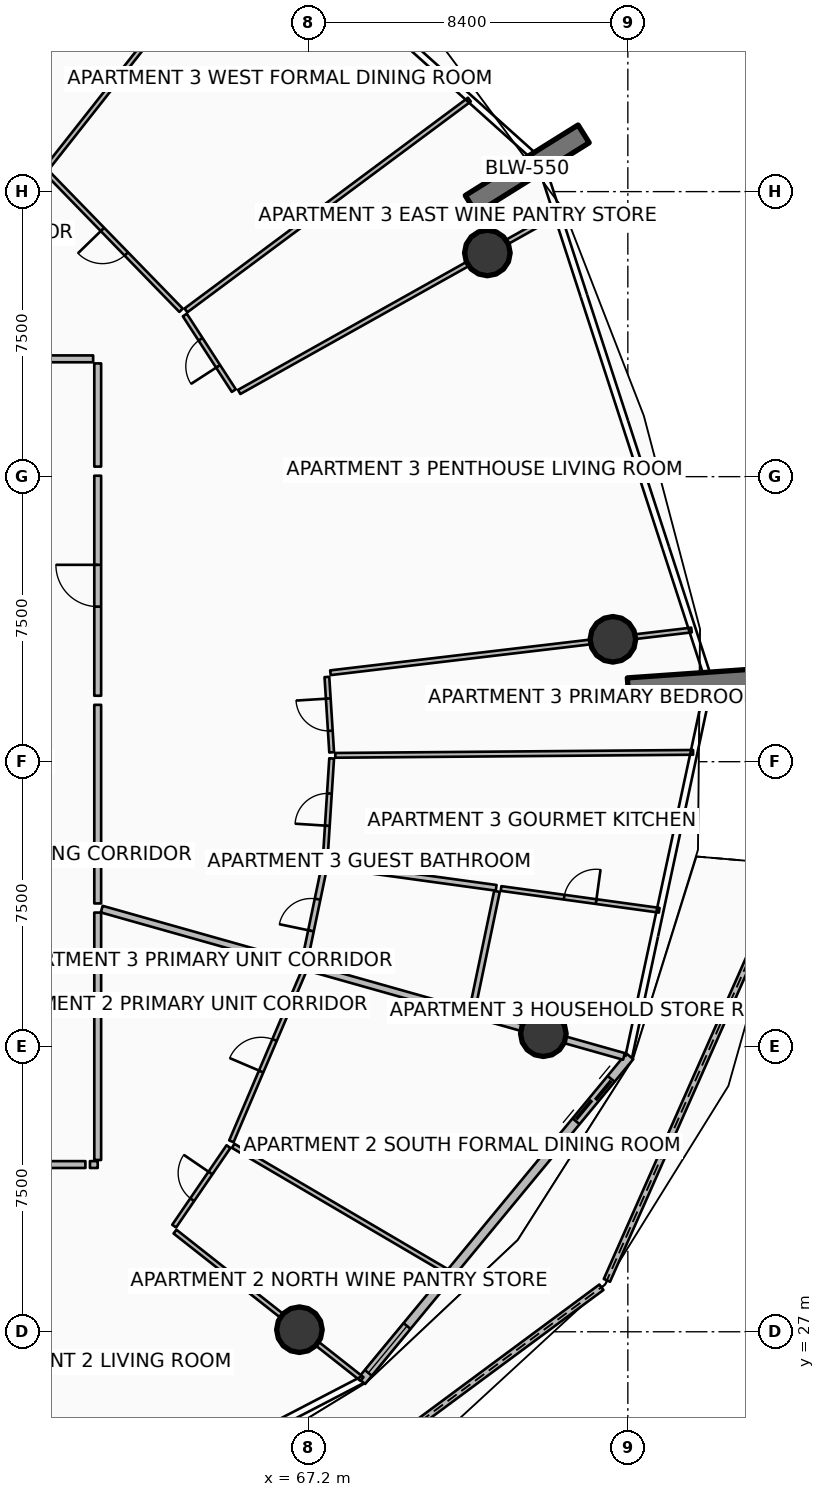
"""IFC4 building model, lengths in metres.
Left out: names, types, materials, properties, quantities, classifications, styles, units other than length and angle.
Written with IfcOpenShell. Run it as: python <this file> out.ifc"""

import sys

from ifc_helpers import new_model, si_unit, direction, frame, frame_2d, origin, origin_2d, place, context, subcontext, project, spatial, polyline, rectangle, circle, outline, extrude, element, fill, save


model = new_model("IFC4")
c1 = context("Model", 3, precision=1e-05, world=origin(), true_north=direction((0.0, 1.0)))
c2 = subcontext(c1, "Body", "Model", "MODEL_VIEW")
j1 = project(units=[si_unit("LENGTHUNIT", "METRE"), si_unit("PLANEANGLEUNIT", "RADIAN")], contexts=[c1])
p1 = place(None, origin())
s1 = spatial("IfcSite", under=j1, at=p1, CompositionType="ELEMENT")
p2 = place(p1, origin())
s2 = spatial("IfcBuilding", under=s1, at=p2, CompositionType="ELEMENT")
p3 = place(p2, frame((0.0, 0.0, 90.15)))
s3 = spatial("IfcBuildingStorey", under=s2, at=p3, CompositionType="ELEMENT", Elevation=90.15)
for number, where, z_axis, x_axis in (
    (1, (71.469, 56.665, 0.0), (0.0, 0.0, 1.0), (0.848, 0.53, 0.0)),
    (2, (75.606, 43.93, 0.0), (0.0, 0.0, 1.0), (0.998, 0.07, 0.0)),
):
    element("IfcWall", number, at=place(p3, frame(where, z_axis=z_axis, x_axis=x_axis)), inside=s3, PredefinedType="SOLIDWALL", context=c2, shape_type="SweptSolid", body=[
        extrude(rectangle(XDim=3.5, YDim=0.55, at=frame_2d((1.75, 0.0))), origin(), (0.0, 0.0, 1.0), 3.75),
    ])
for number, where, z_axis, x_axis in (
    (3, (71.903, 55.386, 0.0), (0.0, 0.0, 1.0), (1.0, 0.0, 0.0)),
    (4, (66.958, 27.055, 0.0), (0.0, 0.0, 1.0), (1.0, 0.0, 0.0)),
    (5, (73.377, 34.843, 0.0), (0.0, 0.0, 1.0), (1.0, 0.0, 0.0)),
    (6, (75.207, 45.22, 0.0), (0.0, 0.0, 1.0), (1.0, 0.0, 0.0)),
):
    element("IfcColumn", number, at=place(p3, frame(where, z_axis=z_axis, x_axis=x_axis)), inside=s3, PredefinedType="COLUMN", context=c2, shape_type="SweptSolid", body=[
        extrude(circle(Radius=0.6, at=origin_2d()), origin(), (0.0, 0.0, 1.0), 3.5),
    ])
p4 = place(p3, frame((65.792, 21.424, 0.0), z_axis=(0.0, 0.0, 1.0), x_axis=(0.803659411402, 0.59508953147, 0.0)))
e7 = element("IfcWall", 7, at=p4, inside=s3, PredefinedType="PARAPET", context=c2, shape_type="SweptSolid", body=[
    extrude(outline(polyline([(0.0, 0.0), (11.338, 0.0), (11.338, 1.832), (5.669, 1.696), (0.0, 1.497), (0.0, 0.0)])), frame((0.0, 0.09, 0.0), z_axis=(0.0, -1.0, 0.0), x_axis=(1.0, 0.0, 0.0)), (0.0, 0.0, 1.0), 0.18),
])
p5 = place(p3, frame((75.049, 28.352, 0.0), z_axis=(0.0, 0.0, 1.0), x_axis=(0.404780674035, 0.914413804537, 0.0)))
e8 = element("IfcWall", 8, at=p5, inside=s3, PredefinedType="PARAPET", context=c2, shape_type="SweptSolid", body=[
    extrude(outline(polyline([(0.0, 0.0), (11.966, 0.0), (11.966, 1.756), (5.983, 1.853), (0.0, 1.832), (0.0, 0.0)])), frame((0.0, 0.09, 0.0), z_axis=(0.0, -1.0, 0.0), x_axis=(1.0, 0.0, 0.0)), (0.0, 0.0, 1.0), 0.18),
])
p6 = place(p3, frame((68.593, 25.702, 0.0), z_axis=(0.0, 0.0, 1.0), x_axis=(0.636704975, 0.771107498868, 0.0)))
e9 = element("IfcWall", 9, at=p6, inside=s3, PredefinedType="SOLIDWALL", context=c2, shape_type="SweptSolid", body=[
    extrude(rectangle(XDim=11.084, YDim=0.24, at=frame_2d((5.542, 0.0))), origin(), (0.0, 0.0, 1.0), 2.45),
])
p7 = place(p6, frame((8.864, 0.0, 0.0)))
e10 = element("IfcOpeningElement", 10, at=p7, cuts=e9, PredefinedType="OPENING", context=c2, shape_type="SweptSolid", body=[
    extrude(rectangle(XDim=1.45, YDim=2.15, at=frame_2d((0.725, 1.075))), frame((0.0, 0.13, 0.0), z_axis=(0.0, -1.0, 0.0), x_axis=(1.0, 0.0, 0.0)), (0.0, 0.0, 1.0), 0.26),
])
p8 = place(p6, frame((0.28, 0.0, 0.65)))
e11 = element("IfcOpeningElement", 11, at=p8, cuts=e9, PredefinedType="OPENING", context=c2, shape_type="SweptSolid", body=[
    extrude(rectangle(XDim=1.6, YDim=1.5, at=frame_2d((0.8, 0.75))), frame((0.0, 0.13, 0.0), z_axis=(0.0, -1.0, 0.0), x_axis=(1.0, 0.0, 0.0)), (0.0, 0.0, 1.0), 0.26),
])
p9 = place(p3, frame((61.756, 38.12, 0.0), z_axis=(0.0, 0.0, 1.0), x_axis=(0.962455861176, -0.271438234756, 0.0)))
e12 = element("IfcWall", 12, at=p9, inside=s3, PredefinedType="PARTITIONING", context=c2, shape_type="SweptSolid", body=[
    extrude(rectangle(XDim=14.279, YDim=0.18, at=frame_2d((7.139, 0.0))), origin(), (0.0, 0.0, 1.0), 2.94),
])
p10 = place(p3, frame((54.056, 31.4, 0.0), z_axis=(0.0, 0.0, 1.0), x_axis=(1.0, 0.0, 0.0)))
e13 = element("IfcWall", 13, at=p10, inside=s3, PredefinedType="PARTITIONING", context=c2, shape_type="SweptSolid", body=[
    extrude(rectangle(XDim=7.27, YDim=0.18, at=frame_2d((3.635, 0.0))), origin(), (0.0, 0.0, 1.0), 2.94),
])
p11 = place(p10, frame((3.085, 0.0, 0.0)))
e14 = element("IfcOpeningElement", 14, at=p11, cuts=e13, PredefinedType="OPENING", context=c2, shape_type="SweptSolid", body=[
    extrude(rectangle(XDim=1.1, YDim=2.1, at=frame_2d((0.55, 1.05))), frame((0.0, 0.1, 0.0), z_axis=(0.0, -1.0, 0.0), x_axis=(1.0, 0.0, 0.0)), (0.0, 0.0, 1.0), 0.2),
])
p12 = place(p3, frame((61.446, 31.4, 0.0), z_axis=(0.0, 0.0, 1.0), x_axis=(1.0, 0.0, 0.0)))
e15 = element("IfcWall", 15, at=p12, inside=s3, PredefinedType="PARTITIONING", context=c2, shape_type="SweptSolid", body=[
    extrude(rectangle(XDim=0.204, YDim=0.18, at=frame_2d((0.102, 0.0))), origin(), (0.0, 0.0, 1.0), 2.94),
])
p13 = place(p3, frame((61.65, 31.52, 0.0), z_axis=(0.0, 0.0, 1.0), x_axis=(0.0, 1.0, 0.0)))
e16 = element("IfcWall", 16, at=p13, inside=s3, PredefinedType="PARTITIONING", context=c2, shape_type="SweptSolid", body=[
    extrude(rectangle(XDim=6.51, YDim=0.18, at=frame_2d((3.255, 0.0))), origin(), (0.0, 0.0, 1.0), 2.94),
])
p14 = place(p3, frame((63.684, 29.635, 0.0), z_axis=(0.0, 0.0, 1.0), x_axis=(0.785296487737, -0.619119880434, 0.0)))
e17 = element("IfcWall", 17, at=p14, inside=s3, PredefinedType="PARTITIONING", context=c2, shape_type="SweptSolid", body=[
    extrude(rectangle(XDim=6.266, YDim=0.125, at=frame_2d((3.133, 0.0))), origin(), (0.0, 0.0, 1.0), 2.94),
])
p15 = place(p3, frame((65.214, 31.893, 0.0), z_axis=(0.0, 0.0, 1.0), x_axis=(0.862328516234, -0.506349217527, 0.0)))
e18 = element("IfcWall", 18, at=p15, inside=s3, PredefinedType="PARTITIONING", context=c2, shape_type="SweptSolid", body=[
    extrude(rectangle(XDim=6.506, YDim=0.125, at=frame_2d((3.253, 0.0))), origin(), (0.0, 0.0, 1.0), 2.94),
])
p16 = place(p3, frame((63.662, 29.78, 0.0), z_axis=(0.0, 0.0, 1.0), x_axis=(0.56409306427, 0.825711217583, 0.0)))
e19 = element("IfcWall", 19, at=p16, inside=s3, PredefinedType="PARTITIONING", context=c2, shape_type="SweptSolid", body=[
    extrude(rectangle(XDim=2.534, YDim=0.125, at=frame_2d((1.267, 0.0))), origin(), (0.0, 0.0, 1.0), 2.94),
])
p17 = place(p16, frame((0.842, 0.0, 0.0)))
e20 = element("IfcOpeningElement", 20, at=p17, cuts=e19, PredefinedType="OPENING", context=c2, shape_type="SweptSolid", body=[
    extrude(rectangle(XDim=0.85, YDim=2.06, at=frame_2d((0.425, 1.03))), frame((0.0, 0.073, 0.0), z_axis=(0.0, -1.0, 0.0), x_axis=(1.0, 0.0, 0.0)), (0.0, 0.0, 1.0), 0.145),
])
p18 = place(p3, frame((65.168, 32.012, 0.0), z_axis=(0.0, 0.0, 1.0), x_axis=(0.392094288326, 0.91992503448, 0.0)))
e21 = element("IfcWall", 21, at=p18, inside=s3, PredefinedType="PARTITIONING", context=c2, shape_type="SweptSolid", body=[
    extrude(rectangle(XDim=4.894, YDim=0.125, at=frame_2d((2.447, 0.0))), origin(), (0.0, 0.0, 1.0), 2.94),
])
p19 = place(p18, frame((1.997, 0.0, 0.0)))
e22 = element("IfcOpeningElement", 22, at=p19, cuts=e21, PredefinedType="OPENING", context=c2, shape_type="SweptSolid", body=[
    extrude(rectangle(XDim=0.9, YDim=2.08, at=frame_2d((0.45, 1.04))), frame((0.0, 0.073, 0.0), z_axis=(0.0, -1.0, 0.0), x_axis=(1.0, 0.0, 0.0)), (0.0, 0.0, 1.0), 0.145),
])
p20 = place(p3, frame((61.65, 43.736, 0.0), z_axis=(0.0, 0.0, 1.0), x_axis=(0.0, 1.0, 0.0)))
e23 = element("IfcWall", 23, at=p20, inside=s3, PredefinedType="PARTITIONING", context=c2, shape_type="SweptSolid", body=[
    extrude(rectangle(XDim=5.789, YDim=0.18, at=frame_2d((2.895, 0.0))), origin(), (0.0, 0.0, 1.0), 2.94),
])
p21 = place(p20, frame((2.344, 0.0, 0.0)))
e24 = element("IfcOpeningElement", 24, at=p21, cuts=e23, PredefinedType="OPENING", context=c2, shape_type="SweptSolid", body=[
    extrude(rectangle(XDim=1.1, YDim=2.1, at=frame_2d((0.55, 1.05))), frame((0.0, 0.1, 0.0), z_axis=(0.0, -1.0, 0.0), x_axis=(1.0, 0.0, 0.0)), (0.0, 0.0, 1.0), 0.2),
])
p22 = place(p3, frame((61.65, 38.27, 0.0), z_axis=(0.0, 0.0, 1.0), x_axis=(0.0, 1.0, 0.0)))
e25 = element("IfcWall", 25, at=p22, inside=s3, PredefinedType="PARTITIONING", context=c2, shape_type="SweptSolid", body=[
    extrude(rectangle(XDim=5.225, YDim=0.18, at=frame_2d((2.613, 0.0))), origin(), (0.0, 0.0, 1.0), 2.94),
])
p23 = place(p3, frame((67.774, 44.341, 0.0), z_axis=(0.0, 0.0, 1.0), x_axis=(0.993071471329, 0.117511926341, 0.0)))
e26 = element("IfcWall", 26, at=p23, inside=s3, PredefinedType="PARTITIONING", context=c2, shape_type="SweptSolid", body=[
    extrude(rectangle(XDim=9.567, YDim=0.125, at=frame_2d((4.784, 0.0))), origin(), (0.0, 0.0, 1.0), 2.94),
])
p24 = place(p3, frame((67.089, 36.72, 0.0), z_axis=(0.0, 0.0, 1.0), x_axis=(0.204314138463, 0.978905374806, 0.0)))
e27 = element("IfcWall", 27, at=p24, inside=s3, PredefinedType="PARTITIONING", context=c2, shape_type="SweptSolid", body=[
    extrude(rectangle(XDim=2.546, YDim=0.15, at=frame_2d((1.273, 0.0))), origin(), (0.0, 0.0, 1.0), 2.94),
])
p25 = place(p24, frame((0.848, 0.0, 0.0)))
e28 = element("IfcOpeningElement", 28, at=p25, cuts=e27, PredefinedType="OPENING", context=c2, shape_type="SweptSolid", body=[
    extrude(rectangle(XDim=0.85, YDim=2.06, at=frame_2d((0.425, 1.03))), frame((0.0, 0.085, 0.0), z_axis=(0.0, -1.0, 0.0), x_axis=(1.0, 0.0, 0.0)), (0.0, 0.0, 1.0), 0.17),
])
p26 = place(p3, frame((71.506, 35.474, 0.0), z_axis=(0.0, 0.0, 1.0), x_axis=(0.204346617078, 0.978898595407, 0.0)))
e29 = element("IfcWall", 29, at=p26, inside=s3, PredefinedType="PARTITIONING", context=c2, shape_type="SweptSolid", body=[
    extrude(rectangle(XDim=3.18, YDim=0.15, at=frame_2d((1.59, 0.0))), origin(), (0.0, 0.0, 1.0), 2.94),
])
p27 = place(p3, frame((67.717, 39.289, 0.0), z_axis=(0.0, 0.0, 1.0), x_axis=(0.99067496126, -0.136246545396, 0.0)))
e30 = element("IfcWall", 30, at=p27, inside=s3, PredefinedType="PARTITIONING", context=c2, shape_type="SweptSolid", body=[
    extrude(rectangle(XDim=4.46, YDim=0.15, at=frame_2d((2.23, 0.0))), origin(), (0.0, 0.0, 1.0), 2.94),
])
p28 = place(p3, frame((72.264, 38.663, 0.0), z_axis=(0.0, 0.0, 1.0), x_axis=(0.990677467282, -0.136228322381, 0.0)))
e31 = element("IfcWall", 31, at=p28, inside=s3, PredefinedType="PARTITIONING", context=c2, shape_type="SweptSolid", body=[
    extrude(rectangle(XDim=4.201, YDim=0.125, at=frame_2d((2.1, 0.0))), origin(), (0.0, 0.0, 1.0), 2.94),
])
p29 = place(p28, frame((1.675, 0.0, 0.0)))
e32 = element("IfcOpeningElement", 32, at=p29, cuts=e31, PredefinedType="OPENING", context=c2, shape_type="SweptSolid", body=[
    extrude(rectangle(XDim=0.85, YDim=2.06, at=frame_2d((0.425, 1.03))), frame((0.0, 0.073, 0.0), z_axis=(0.0, -1.0, 0.0), x_axis=(1.0, 0.0, 0.0)), (0.0, 0.0, 1.0), 0.145),
])
p30 = place(p3, frame((67.901, 42.167, 0.0), z_axis=(0.0, 0.0, 1.0), x_axis=(0.999964927596, 0.008375176238, 0.0)))
e33 = element("IfcWall", 33, at=p30, inside=s3, PredefinedType="PARTITIONING", context=c2, shape_type="SweptSolid", body=[
    extrude(rectangle(XDim=9.416, YDim=0.125, at=frame_2d((4.708, 0.0))), origin(), (0.0, 0.0, 1.0), 2.94),
])
p31 = place(p3, frame((67.633, 39.391, 0.0), z_axis=(0.0, 0.0, 1.0), x_axis=(0.064077427582, 0.997944929981, 0.0)))
e34 = element("IfcWall", 34, at=p31, inside=s3, PredefinedType="PARTITIONING", context=c2, shape_type="SweptSolid", body=[
    extrude(rectangle(XDim=2.701, YDim=0.125, at=frame_2d((1.351, 0.0))), origin(), (0.0, 0.0, 1.0), 2.94),
])
p32 = place(p31, frame((0.926, 0.0, 0.0)))
e35 = element("IfcOpeningElement", 35, at=p32, cuts=e34, PredefinedType="OPENING", context=c2, shape_type="SweptSolid", body=[
    extrude(rectangle(XDim=0.85, YDim=2.06, at=frame_2d((0.425, 1.03))), frame((0.0, 0.073, 0.0), z_axis=(0.0, -1.0, 0.0), x_axis=(1.0, 0.0, 0.0)), (0.0, 0.0, 1.0), 0.145),
])
p33 = place(p3, frame((67.806, 42.246, 0.0), z_axis=(0.0, 0.0, 1.0), x_axis=(-0.06315855722, 0.998003505329, 0.0)))
e36 = element("IfcWall", 36, at=p33, inside=s3, PredefinedType="PARTITIONING", context=c2, shape_type="SweptSolid", body=[
    extrude(rectangle(XDim=1.987, YDim=0.125, at=frame_2d((0.993, 0.0))), origin(), (0.0, 0.0, 1.0), 2.94),
])
p34 = place(p33, frame((0.568, 0.0, 0.0)))
e37 = element("IfcOpeningElement", 37, at=p34, cuts=e36, PredefinedType="OPENING", context=c2, shape_type="SweptSolid", body=[
    extrude(rectangle(XDim=0.85, YDim=2.06, at=frame_2d((0.425, 1.03))), frame((0.0, 0.073, 0.0), z_axis=(0.0, -1.0, 0.0), x_axis=(1.0, 0.0, 0.0)), (0.0, 0.0, 1.0), 0.145),
])
p35 = place(p3, frame((61.65, 49.764, 0.0), z_axis=(0.0, 0.0, 1.0), x_axis=(0.0, 1.0, 0.0)))
e38 = element("IfcWall", 38, at=p35, inside=s3, PredefinedType="PARTITIONING", context=c2, shape_type="SweptSolid", body=[
    extrude(rectangle(XDim=2.716, YDim=0.18, at=frame_2d((1.358, 0.0))), origin(), (0.0, 0.0, 1.0), 2.94),
])
p36 = place(p3, frame((61.53, 52.6, 0.0), z_axis=(0.0, 0.0, 1.0), x_axis=(-1.0, 0.0, 0.0)))
e39 = element("IfcWall", 39, at=p36, inside=s3, PredefinedType="PARTITIONING", context=c2, shape_type="SweptSolid", body=[
    extrude(rectangle(XDim=5.054, YDim=0.18, at=frame_2d((2.527, 0.0))), origin(), (0.0, 0.0, 1.0), 2.94),
])
p37 = place(p3, frame((65.373, 51.729, 0.0), z_axis=(0.0, 0.0, 1.0), x_axis=(0.872500794254, 0.488612693272, 0.0)))
e40 = element("IfcWall", 40, at=p37, inside=s3, PredefinedType="PARTITIONING", context=c2, shape_type="SweptSolid", body=[
    extrude(rectangle(XDim=9.568, YDim=0.125, at=frame_2d((4.784, 0.0))), origin(), (0.0, 0.0, 1.0), 2.94),
])
p38 = place(p3, frame((63.971, 53.875, 0.0), z_axis=(0.0, 0.0, 1.0), x_axis=(0.802511356626, 0.596636843052, 0.0)))
e41 = element("IfcWall", 41, at=p38, inside=s3, PredefinedType="PARTITIONING", context=c2, shape_type="SweptSolid", body=[
    extrude(rectangle(XDim=9.295, YDim=0.125, at=frame_2d((4.647, 0.0))), origin(), (0.0, 0.0, 1.0), 2.94),
])
p39 = place(p3, frame((65.231, 51.764, 0.0), z_axis=(0.0, 0.0, 1.0), x_axis=(-0.543742324159, 0.839252217702, 0.0)))
e42 = element("IfcWall", 42, at=p39, inside=s3, PredefinedType="PARTITIONING", context=c2, shape_type="SweptSolid", body=[
    extrude(rectangle(XDim=2.37, YDim=0.125, at=frame_2d((1.185, 0.0))), origin(), (0.0, 0.0, 1.0), 2.94),
])
p40 = place(p39, frame((0.76, 0.0, 0.0)))
e43 = element("IfcOpeningElement", 43, at=p40, cuts=e42, PredefinedType="OPENING", context=c2, shape_type="SweptSolid", body=[
    extrude(rectangle(XDim=0.85, YDim=2.06, at=frame_2d((0.425, 1.03))), frame((0.0, 0.073, 0.0), z_axis=(0.0, -1.0, 0.0), x_axis=(1.0, 0.0, 0.0)), (0.0, 0.0, 1.0), 0.145),
])
p41 = place(p3, frame((63.844, 53.878, 0.0), z_axis=(0.0, 0.0, 1.0), x_axis=(-0.697043758456, 0.717028589944, 0.0)))
e44 = element("IfcWall", 44, at=p41, inside=s3, PredefinedType="PARTITIONING", context=c2, shape_type="SweptSolid", body=[
    extrude(rectangle(XDim=5.033, YDim=0.125, at=frame_2d((2.517, 0.0))), origin(), (0.0, 0.0, 1.0), 2.94),
])
p42 = place(p41, frame((2.066, 0.0, 0.0)))
e45 = element("IfcOpeningElement", 45, at=p42, cuts=e44, PredefinedType="OPENING", context=c2, shape_type="SweptSolid", body=[
    extrude(rectangle(XDim=0.9, YDim=2.08, at=frame_2d((0.45, 1.04))), frame((0.0, 0.073, 0.0), z_axis=(0.0, -1.0, 0.0), x_axis=(1.0, 0.0, 0.0)), (0.0, 0.0, 1.0), 0.145),
])
p43 = place(p3, frame((60.327, 57.637, 0.0), z_axis=(0.0, 0.0, 1.0), x_axis=(0.619087433546, 0.785322067451, 0.0)))
e46 = element("IfcWall", 46, at=p43, inside=s3, PredefinedType="PARTITIONING", context=c2, shape_type="SweptSolid", body=[
    extrude(rectangle(XDim=8.759, YDim=0.125, at=frame_2d((4.379, 0.0))), origin(), (0.0, 0.0, 1.0), 2.94),
])
p44 = place(p3, frame((58.232, 59.071, 0.0), z_axis=(0.0, 0.0, 1.0), x_axis=(0.514095403265, 0.857733009941, 0.0)))
e47 = element("IfcWall", 47, at=p44, inside=s3, PredefinedType="PARTITIONING", context=c2, shape_type="SweptSolid", body=[
    extrude(rectangle(XDim=7.355, YDim=0.125, at=frame_2d((3.677, 0.0))), origin(), (0.0, 0.0, 1.0), 2.94),
])
p45 = place(p7, origin())
e48 = element("IfcDoor", 48, at=p45, inside=s3, OperationType="DOUBLE_DOOR_SLIDING", PredefinedType="DOOR", context=c2, shape_type="SweptSolid", body=[
    extrude(rectangle(XDim=1.45, YDim=2.15, at=frame_2d((0.725, 1.075))), frame((0.0, 0.025, 0.0), z_axis=(0.0, -1.0, 0.0), x_axis=(1.0, 0.0, 0.0)), (0.0, 0.0, 1.0), 0.05),
])
fill(e10, e48)
p46 = place(p8, origin())
e49 = element("IfcWindow", 49, at=p46, inside=s3, PartitioningType="SINGLE_PANEL", PredefinedType="WINDOW", context=c2, shape_type="SweptSolid", body=[
    extrude(rectangle(XDim=1.6, YDim=1.5, at=frame_2d((0.8, 0.75))), frame((0.0, 0.03, 0.0), z_axis=(0.0, -1.0, 0.0), x_axis=(1.0, 0.0, 0.0)), (0.0, 0.0, 1.0), 0.06),
])
fill(e11, e49)
p47 = place(p17, origin())
e50 = element("IfcDoor", 50, at=p47, inside=s3, OperationType="SINGLE_SWING_RIGHT", PredefinedType="DOOR", context=c2, shape_type="SweptSolid", body=[
    extrude(rectangle(XDim=0.85, YDim=2.06, at=frame_2d((0.425, 1.03))), frame((0.0, 0.025, 0.0), z_axis=(0.0, -1.0, 0.0), x_axis=(1.0, 0.0, 0.0)), (0.0, 0.0, 1.0), 0.05),
])
fill(e20, e50)
p48 = place(p19, origin())
e51 = element("IfcDoor", 51, at=p48, inside=s3, OperationType="SINGLE_SWING_LEFT", PredefinedType="DOOR", context=c2, shape_type="SweptSolid", body=[
    extrude(rectangle(XDim=0.9, YDim=2.08, at=frame_2d((0.45, 1.04))), frame((0.0, 0.025, 0.0), z_axis=(0.0, -1.0, 0.0), x_axis=(1.0, 0.0, 0.0)), (0.0, 0.0, 1.0), 0.05),
])
fill(e22, e51)
p49 = place(p21, origin())
e52 = element("IfcDoor", 52, at=p49, inside=s3, OperationType="SINGLE_SWING_RIGHT", PredefinedType="DOOR", context=c2, shape_type="SweptSolid", body=[
    extrude(rectangle(XDim=1.1, YDim=2.1, at=frame_2d((0.55, 1.05))), frame((0.0, 0.025, 0.0), z_axis=(0.0, -1.0, 0.0), x_axis=(1.0, 0.0, 0.0)), (0.0, 0.0, 1.0), 0.05),
])
fill(e24, e52)
p50 = place(p25, origin())
e53 = element("IfcDoor", 53, at=p50, inside=s3, OperationType="SINGLE_SWING_LEFT", PredefinedType="DOOR", context=c2, shape_type="SweptSolid", body=[
    extrude(rectangle(XDim=0.85, YDim=2.06, at=frame_2d((0.425, 1.03))), frame((0.0, 0.025, 0.0), z_axis=(0.0, -1.0, 0.0), x_axis=(1.0, 0.0, 0.0)), (0.0, 0.0, 1.0), 0.05),
])
fill(e28, e53)
p51 = place(p29, origin())
e54 = element("IfcDoor", 54, at=p51, inside=s3, OperationType="SINGLE_SWING_RIGHT", PredefinedType="DOOR", context=c2, shape_type="SweptSolid", body=[
    extrude(rectangle(XDim=0.85, YDim=2.06, at=frame_2d((0.425, 1.03))), frame((0.0, 0.025, 0.0), z_axis=(0.0, -1.0, 0.0), x_axis=(1.0, 0.0, 0.0)), (0.0, 0.0, 1.0), 0.05),
])
fill(e32, e54)
p52 = place(p32, origin())
e55 = element("IfcDoor", 55, at=p52, inside=s3, OperationType="SINGLE_SWING_LEFT", PredefinedType="DOOR", context=c2, shape_type="SweptSolid", body=[
    extrude(rectangle(XDim=0.85, YDim=2.06, at=frame_2d((0.425, 1.03))), frame((0.0, 0.025, 0.0), z_axis=(0.0, -1.0, 0.0), x_axis=(1.0, 0.0, 0.0)), (0.0, 0.0, 1.0), 0.05),
])
fill(e35, e55)
p53 = place(p34, origin())
e56 = element("IfcDoor", 56, at=p53, inside=s3, OperationType="SINGLE_SWING_RIGHT", PredefinedType="DOOR", context=c2, shape_type="SweptSolid", body=[
    extrude(rectangle(XDim=0.85, YDim=2.06, at=frame_2d((0.425, 1.03))), frame((0.0, 0.025, 0.0), z_axis=(0.0, -1.0, 0.0), x_axis=(1.0, 0.0, 0.0)), (0.0, 0.0, 1.0), 0.05),
])
fill(e37, e56)
p54 = place(p40, origin())
e57 = element("IfcDoor", 57, at=p54, inside=s3, OperationType="SINGLE_SWING_LEFT", PredefinedType="DOOR", context=c2, shape_type="SweptSolid", body=[
    extrude(rectangle(XDim=0.85, YDim=2.06, at=frame_2d((0.425, 1.03))), frame((0.0, 0.025, 0.0), z_axis=(0.0, -1.0, 0.0), x_axis=(1.0, 0.0, 0.0)), (0.0, 0.0, 1.0), 0.05),
])
fill(e43, e57)
p55 = place(p42, origin())
e58 = element("IfcDoor", 58, at=p55, inside=s3, OperationType="SINGLE_SWING_RIGHT", PredefinedType="DOOR", context=c2, shape_type="SweptSolid", body=[
    extrude(rectangle(XDim=0.9, YDim=2.08, at=frame_2d((0.45, 1.04))), frame((0.0, 0.025, 0.0), z_axis=(0.0, -1.0, 0.0), x_axis=(1.0, 0.0, 0.0)), (0.0, 0.0, 1.0), 0.05),
])
fill(e45, e58)
save(model, sys.argv[1])
